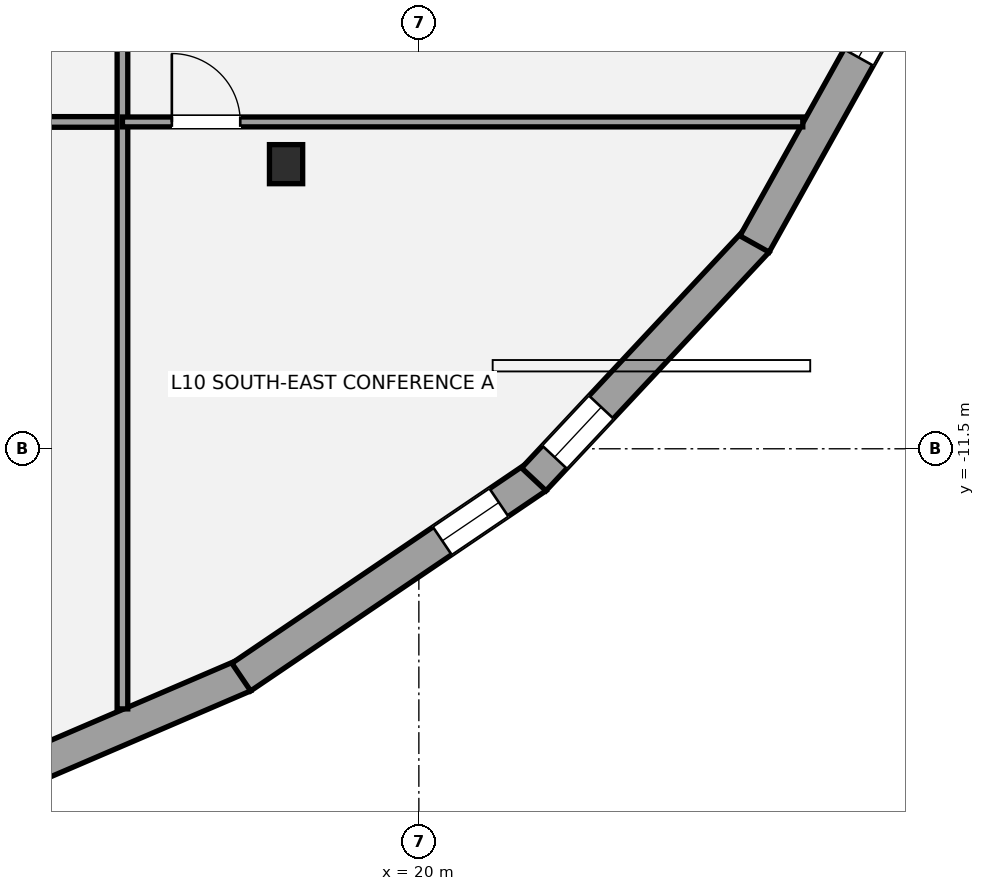
"""IFC4 building model, lengths in metres.
Left out: names, types, materials, properties, quantities, classifications, styles, units other than length and angle.
Written with IfcOpenShell. Run it as: python <this file> out.ifc"""

import sys

from ifc_helpers import new_model, si_unit, direction, frame, frame_2d, origin, origin_2d, place, context, subcontext, project, spatial, rectangle, i_section, extrude, element, fill, save


model = new_model("IFC4")
c1 = context("Model", 3, precision=1e-05, world=origin(), true_north=direction((0.0, 1.0)))
c2 = subcontext(c1, "Body", "Model", "MODEL_VIEW")
j1 = project(units=[si_unit("LENGTHUNIT", "METRE"), si_unit("PLANEANGLEUNIT", "RADIAN")], contexts=[c1])
p1 = place(None, origin())
s1 = spatial("IfcSite", under=j1, at=p1, CompositionType="ELEMENT")
p2 = place(p1, origin())
s2 = spatial("IfcBuilding", under=s1, at=p2, CompositionType="ELEMENT")
p3 = place(p2, frame((0.0, 0.0, 41.4)))
s3 = spatial("IfcBuildingStorey", under=s2, at=p3, CompositionType="ELEMENT", Elevation=41.4)
p4 = place(p3, frame((18.253, -7.756, 0.0), z_axis=(0.0, 0.0, 1.0), x_axis=(1.0, 0.0, 0.0)))
e1 = element("IfcColumn", 1, at=p4, inside=s3, PredefinedType="COLUMN", context=c2, shape_type="SweptSolid", body=[
    extrude(i_section(OverallWidth=0.437, OverallDepth=0.514, WebThickness=0.061, FlangeThickness=0.097, at=origin_2d()), origin(), (0.0, 0.0, 1.0), 3.6),
])
p5 = place(p3, frame((17.7, -14.483, 0.0), z_axis=(0.0, 0.0, 1.0), x_axis=(-0.918881850071, -0.394532819433, 0.0)))
e2 = element("IfcWall", 2, at=p5, inside=s3, PredefinedType="STANDARD", context=c2, shape_type="SweptSolid", body=[
    extrude(rectangle(XDim=5.042, YDim=0.44, at=frame_2d((2.521, 0.0))), origin(), (0.0, 0.0, 1.0), 2.529),
])
p6 = place(p5, frame((3.442, 0.0, 0.45)))
e3 = element("IfcOpeningElement", 3, at=p6, cuts=e2, PredefinedType="OPENING", context=c2, shape_type="SweptSolid", body=[
    extrude(rectangle(XDim=1.4, YDim=1.55, at=frame_2d((0.7, 0.775))), frame((0.0, 0.23, 0.0), z_axis=(0.0, -1.0, 0.0), x_axis=(1.0, 0.0, 0.0)), (0.0, 0.0, 1.0), 0.46),
])
p7 = place(p3, frame((21.549, -11.87, 0.0), z_axis=(0.0, 0.0, 1.0), x_axis=(-0.827825981515, -0.560984976919, 0.0)))
e4 = element("IfcWall", 4, at=p7, inside=s3, PredefinedType="STANDARD", context=c2, shape_type="SweptSolid", body=[
    extrude(rectangle(XDim=4.695, YDim=0.44, at=frame_2d((2.347, 0.0))), origin(), (0.0, 0.0, 1.0), 2.529),
])
p8 = place(p7, frame((0.599, 0.0, 0.58)))
e5 = element("IfcOpeningElement", 5, at=p8, cuts=e4, PredefinedType="OPENING", context=c2, shape_type="SweptSolid", body=[
    extrude(rectangle(XDim=0.9, YDim=1.35, at=frame_2d((0.45, 0.675))), frame((0.0, 0.23, 0.0), z_axis=(0.0, -1.0, 0.0), x_axis=(1.0, 0.0, 0.0)), (0.0, 0.0, 1.0), 0.46),
])
p9 = place(p3, frame((24.448, -8.763, 0.0), z_axis=(0.0, 0.0, 1.0), x_axis=(-0.68299392258, -0.730424056093, 0.0)))
e6 = element("IfcWall", 6, at=p9, inside=s3, PredefinedType="STANDARD", context=c2, shape_type="SweptSolid", body=[
    extrude(rectangle(XDim=4.298, YDim=0.44, at=frame_2d((2.149, 0.0))), origin(), (0.0, 0.0, 1.0), 2.529),
])
p10 = place(p9, frame((2.998, 0.0, 0.58)))
e7 = element("IfcOpeningElement", 7, at=p10, cuts=e6, PredefinedType="OPENING", context=c2, shape_type="SweptSolid", body=[
    extrude(rectangle(XDim=0.9, YDim=1.35, at=frame_2d((0.45, 0.675))), frame((0.0, 0.23, 0.0), z_axis=(0.0, -1.0, 0.0), x_axis=(1.0, 0.0, 0.0)), (0.0, 0.0, 1.0), 0.46),
])
p11 = place(p3, frame((26.346, -5.348, 0.0), z_axis=(0.0, 0.0, 1.0), x_axis=(-0.487369438963, -0.873195871477, 0.0)))
e8 = element("IfcWall", 8, at=p11, inside=s3, PredefinedType="STANDARD", context=c2, shape_type="SweptSolid", body=[
    extrude(rectangle(XDim=3.96, YDim=0.44, at=frame_2d((1.98, 0.0))), origin(), (0.0, 0.0, 1.0), 2.529),
])
p12 = place(p11, frame((0.249, 0.0, 0.58)))
e9 = element("IfcOpeningElement", 9, at=p12, cuts=e8, PredefinedType="OPENING", context=c2, shape_type="SweptSolid", body=[
    extrude(rectangle(XDim=0.9, YDim=1.35, at=frame_2d((0.45, 0.675))), frame((0.0, 0.23, 0.0), z_axis=(0.0, -1.0, 0.0), x_axis=(1.0, 0.0, 0.0)), (0.0, 0.0, 1.0), 0.46),
])
p13 = place(p3, frame((-17.8, -7.2, 0.0), z_axis=(0.0, 0.0, 1.0), x_axis=(1.0, 0.0, 0.0)))
e10 = element("IfcWall", 10, at=p13, inside=s3, PredefinedType="PARTITIONING", context=c2, shape_type="SweptSolid", body=[
    extrude(rectangle(XDim=33.9, YDim=0.14, at=frame_2d((16.95, 0.0))), origin(), (0.0, 0.0, 1.0), 2.853),
])
p14 = place(p13, frame((5.65, 0.0, 0.0)))
e11 = element("IfcOpeningElement", 11, at=p14, cuts=e10, PredefinedType="OPENING", context=c2, shape_type="SweptSolid", body=[
    extrude(rectangle(XDim=1.5, YDim=2.15, at=frame_2d((0.75, 1.075))), frame((0.0, 0.08, 0.0), z_axis=(0.0, -1.0, 0.0), x_axis=(1.0, 0.0, 0.0)), (0.0, 0.0, 1.0), 0.16),
])
p15 = place(p13, frame((17.05, 0.0, 0.0)))
e12 = element("IfcOpeningElement", 12, at=p15, cuts=e10, PredefinedType="OPENING", context=c2, shape_type="SweptSolid", body=[
    extrude(rectangle(XDim=1.5, YDim=2.15, at=frame_2d((0.75, 1.075))), frame((0.0, 0.08, 0.0), z_axis=(0.0, -1.0, 0.0), x_axis=(1.0, 0.0, 0.0)), (0.0, 0.0, 1.0), 0.16),
])
p16 = place(p13, frame((27.6, 0.0, 0.0)))
e13 = element("IfcOpeningElement", 13, at=p16, cuts=e10, PredefinedType="OPENING", context=c2, shape_type="SweptSolid", body=[
    extrude(rectangle(XDim=1.5, YDim=2.15, at=frame_2d((0.75, 1.075))), frame((0.0, 0.08, 0.0), z_axis=(0.0, -1.0, 0.0), x_axis=(1.0, 0.0, 0.0)), (0.0, 0.0, 1.0), 0.16),
])
p17 = place(p3, frame((16.1, -14.922, 0.0), z_axis=(0.0, 0.0, 1.0), x_axis=(0.0, 1.0, 0.0)))
e14 = element("IfcWall", 14, at=p17, inside=s3, PredefinedType="PARTITIONING", context=c2, shape_type="SweptSolid", body=[
    extrude(rectangle(XDim=20.772, YDim=0.14, at=frame_2d((10.386, 0.0))), origin(), (0.0, 0.0, 1.0), 2.841),
])
p18 = place(p17, frame((9.772, 0.0, 0.0)))
e15 = element("IfcOpeningElement", 15, at=p18, cuts=e14, PredefinedType="OPENING", context=c2, shape_type="SweptSolid", body=[
    extrude(rectangle(XDim=0.9, YDim=2.1, at=frame_2d((0.45, 1.05))), frame((0.0, 0.08, 0.0), z_axis=(0.0, -1.0, 0.0), x_axis=(1.0, 0.0, 0.0)), (0.0, 0.0, 1.0), 0.16),
])
p19 = place(p17, frame((14.572, 0.0, 0.0)))
e16 = element("IfcOpeningElement", 16, at=p19, cuts=e14, PredefinedType="OPENING", context=c2, shape_type="SweptSolid", body=[
    extrude(rectangle(XDim=0.9, YDim=2.1, at=frame_2d((0.45, 1.05))), frame((0.0, 0.08, 0.0), z_axis=(0.0, -1.0, 0.0), x_axis=(1.0, 0.0, 0.0)), (0.0, 0.0, 1.0), 0.16),
])
p20 = place(p17, frame((18.597, 0.0, 0.0)))
e17 = element("IfcOpeningElement", 17, at=p20, cuts=e14, PredefinedType="OPENING", context=c2, shape_type="SweptSolid", body=[
    extrude(rectangle(XDim=0.9, YDim=2.1, at=frame_2d((0.45, 1.05))), frame((0.0, 0.08, 0.0), z_axis=(0.0, -1.0, 0.0), x_axis=(1.0, 0.0, 0.0)), (0.0, 0.0, 1.0), 0.16),
])
p21 = place(p3, frame((16.1, -7.2, 0.0), z_axis=(0.0, 0.0, 1.0), x_axis=(1.0, 0.0, 0.0)))
e18 = element("IfcWall", 18, at=p21, inside=s3, PredefinedType="PARTITIONING", context=c2, shape_type="SweptSolid", body=[
    extrude(rectangle(XDim=8.951, YDim=0.13, at=frame_2d((4.476, 0.0))), origin(), (0.0, 0.0, 1.0), 2.779),
])
p22 = place(p21, frame((0.65, 0.0, 0.0)))
e19 = element("IfcOpeningElement", 19, at=p22, cuts=e18, PredefinedType="OPENING", context=c2, shape_type="SweptSolid", body=[
    extrude(rectangle(XDim=0.9, YDim=2.1, at=frame_2d((0.45, 1.05))), frame((0.0, 0.075, 0.0), z_axis=(0.0, -1.0, 0.0), x_axis=(1.0, 0.0, 0.0)), (0.0, 0.0, 1.0), 0.15),
])
p23 = place(p8, origin())
e20 = element("IfcWindow", 20, at=p23, inside=s3, PartitioningType="SINGLE_PANEL", PredefinedType="WINDOW", context=c2, shape_type="SweptSolid", body=[
    extrude(rectangle(XDim=0.9, YDim=1.35, at=frame_2d((0.45, 0.675))), frame((0.0, -0.01, 0.0), z_axis=(0.0, -1.0, 0.0), x_axis=(1.0, 0.0, 0.0)), (0.0, 0.0, 1.0), 0.06),
])
fill(e5, e20)
p24 = place(p10, origin())
e21 = element("IfcWindow", 21, at=p24, inside=s3, PartitioningType="SINGLE_PANEL", PredefinedType="WINDOW", context=c2, shape_type="SweptSolid", body=[
    extrude(rectangle(XDim=0.9, YDim=1.35, at=frame_2d((0.45, 0.675))), frame((0.0, -0.01, 0.0), z_axis=(0.0, -1.0, 0.0), x_axis=(1.0, 0.0, 0.0)), (0.0, 0.0, 1.0), 0.06),
])
fill(e7, e21)
p25 = place(p12, origin())
e22 = element("IfcWindow", 22, at=p25, inside=s3, PartitioningType="SINGLE_PANEL", PredefinedType="WINDOW", context=c2, shape_type="SweptSolid", body=[
    extrude(rectangle(XDim=0.9, YDim=1.35, at=frame_2d((0.45, 0.675))), frame((0.0, -0.01, 0.0), z_axis=(0.0, -1.0, 0.0), x_axis=(1.0, 0.0, 0.0)), (0.0, 0.0, 1.0), 0.06),
])
fill(e9, e22)
p26 = place(p22, origin())
e23 = element("IfcDoor", 23, at=p26, inside=s3, OperationType="SINGLE_SWING_LEFT", PredefinedType="DOOR", context=c2, shape_type="SweptSolid", body=[
    extrude(rectangle(XDim=0.9, YDim=2.1, at=frame_2d((0.45, 1.05))), frame((0.0, 0.025, 0.0), z_axis=(0.0, -1.0, 0.0), x_axis=(1.0, 0.0, 0.0)), (0.0, 0.0, 1.0), 0.05),
])
fill(e19, e23)
save(model, sys.argv[1])
